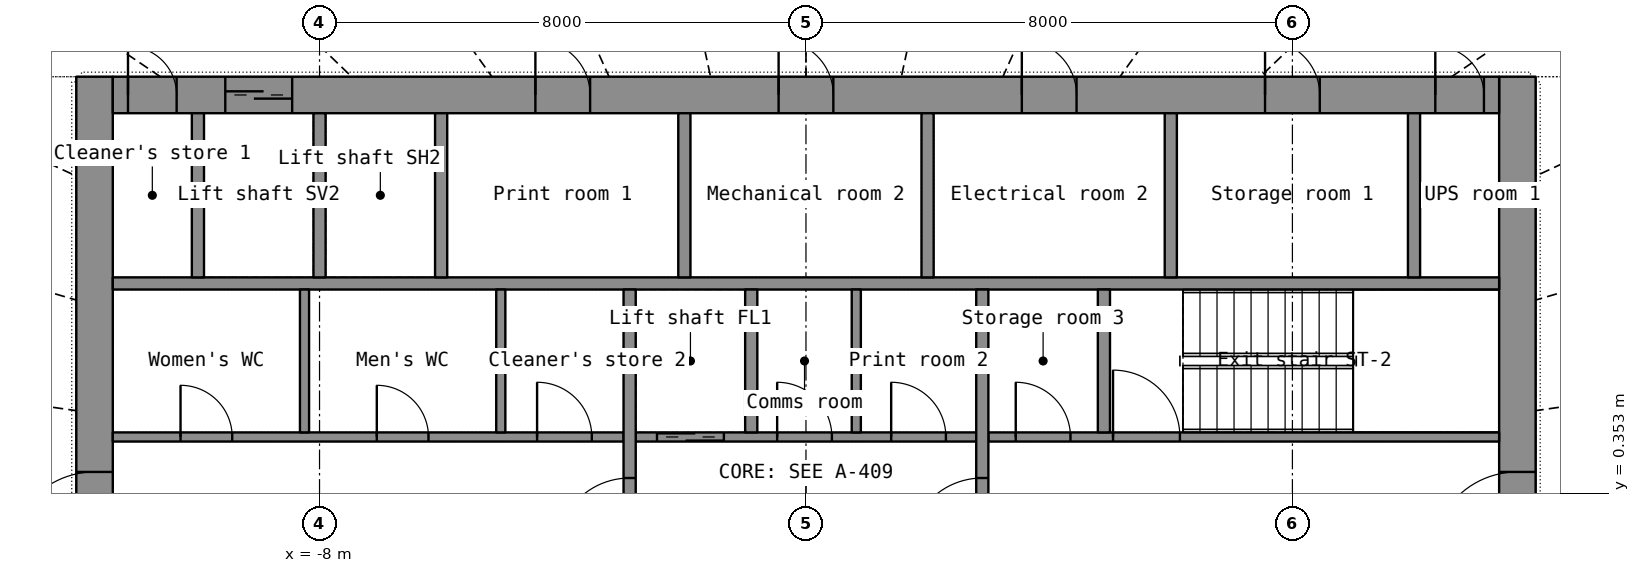
"""IFC4 building model, lengths in metres.
Left out: names, types, materials, properties, quantities, classifications, styles, units other than length and angle.
Written with IfcOpenShell. Run it as: python <this file> out.ifc"""

import sys

from ifc_helpers import new_model, si_unit, direction, frame, frame_2d, origin, place, context, subcontext, project, spatial, rectangle, extrude, element, fill, save


model = new_model("IFC4")
c1 = context("Model", 3, precision=1e-05, world=origin(), true_north=direction((0.0, 1.0)))
c2 = subcontext(c1, "Body", "Model", "MODEL_VIEW")
j1 = project(units=[si_unit("LENGTHUNIT", "METRE"), si_unit("PLANEANGLEUNIT", "RADIAN")], contexts=[c1])
p1 = place(None, origin())
s1 = spatial("IfcSite", under=j1, at=p1, CompositionType="ELEMENT")
p2 = place(p1, origin())
s2 = spatial("IfcBuilding", under=s1, at=p2, CompositionType="ELEMENT")
p3 = place(p2, frame((0.0, 0.0, 55.6)))
s3 = spatial("IfcBuildingStorey", under=s2, at=p3, CompositionType="ELEMENT", Elevation=55.6)
p4 = place(p3, frame((-11.7, -7.2, 0.0), z_axis=(0.0, 0.0, 1.0), x_axis=(0.0, 1.0, 0.0)))
e1 = element("IfcWall", 1, at=p4, inside=s3, PredefinedType="SHEAR", context=c2, shape_type="SweptSolid", body=[
    extrude(rectangle(XDim=14.4, YDim=0.6, at=frame_2d((7.2, 0.0))), origin(), (0.0, 0.0, 1.0), 3.3),
])
p5 = place(p4, frame((6.5, 0.0, 0.0)))
e2 = element("IfcOpeningElement", 2, at=p5, cuts=e1, PredefinedType="OPENING", context=c2, shape_type="SweptSolid", body=[
    extrude(rectangle(XDim=1.4, YDim=2.2, at=frame_2d((0.7, 1.1))), frame((0.0, 0.31, 0.0), z_axis=(0.0, -1.0, 0.0), x_axis=(1.0, 0.0, 0.0)), (0.0, 0.0, 1.0), 0.62),
])
p6 = place(p3, frame((11.7, -7.2, 0.0), z_axis=(0.0, 0.0, 1.0), x_axis=(0.0, 1.0, 0.0)))
e3 = element("IfcWall", 3, at=p6, inside=s3, PredefinedType="SHEAR", context=c2, shape_type="SweptSolid", body=[
    extrude(rectangle(XDim=14.4, YDim=0.6, at=frame_2d((7.2, 0.0))), origin(), (0.0, 0.0, 1.0), 3.3),
])
p7 = place(p6, frame((6.5, 0.0, 0.0)))
e4 = element("IfcOpeningElement", 4, at=p7, cuts=e3, PredefinedType="OPENING", context=c2, shape_type="SweptSolid", body=[
    extrude(rectangle(XDim=1.4, YDim=2.2, at=frame_2d((0.7, 1.1))), frame((0.0, 0.31, 0.0), z_axis=(0.0, -1.0, 0.0), x_axis=(1.0, 0.0, 0.0)), (0.0, 0.0, 1.0), 0.62),
])
p8 = place(p3, frame((-11.4, 6.9, 0.0), z_axis=(0.0, 0.0, 1.0), x_axis=(1.0, 0.0, 0.0)))
e5 = element("IfcWall", 5, at=p8, inside=s3, PredefinedType="SHEAR", context=c2, shape_type="SweptSolid", body=[
    extrude(rectangle(XDim=22.8, YDim=0.6, at=frame_2d((11.4, 0.0))), origin(), (0.0, 0.0, 1.0), 3.3),
])
p9 = place(p8, frame((1.85, 0.0, 0.0)))
e6 = element("IfcOpeningElement", 6, at=p9, cuts=e5, PredefinedType="OPENING", context=c2, shape_type="SweptSolid", body=[
    extrude(rectangle(XDim=1.1, YDim=2.2, at=frame_2d((0.55, 1.1))), frame((0.0, 0.31, 0.0), z_axis=(0.0, -1.0, 0.0), x_axis=(1.0, 0.0, 0.0)), (0.0, 0.0, 1.0), 0.62),
])
p10 = place(p8, frame((6.95, 0.0, 0.0)))
e7 = element("IfcOpeningElement", 7, at=p10, cuts=e5, PredefinedType="OPENING", context=c2, shape_type="SweptSolid", body=[
    extrude(rectangle(XDim=0.9, YDim=2.1, at=frame_2d((0.45, 1.05))), frame((0.0, 0.31, 0.0), z_axis=(0.0, -1.0, 0.0), x_axis=(1.0, 0.0, 0.0)), (0.0, 0.0, 1.0), 0.62),
])
p11 = place(p8, frame((10.95, 0.0, 0.0)))
e8 = element("IfcOpeningElement", 8, at=p11, cuts=e5, PredefinedType="OPENING", context=c2, shape_type="SweptSolid", body=[
    extrude(rectangle(XDim=0.9, YDim=2.1, at=frame_2d((0.45, 1.05))), frame((0.0, 0.31, 0.0), z_axis=(0.0, -1.0, 0.0), x_axis=(1.0, 0.0, 0.0)), (0.0, 0.0, 1.0), 0.62),
])
p12 = place(p8, frame((14.95, 0.0, 0.0)))
e9 = element("IfcOpeningElement", 9, at=p12, cuts=e5, PredefinedType="OPENING", context=c2, shape_type="SweptSolid", body=[
    extrude(rectangle(XDim=0.9, YDim=2.1, at=frame_2d((0.45, 1.05))), frame((0.0, 0.31, 0.0), z_axis=(0.0, -1.0, 0.0), x_axis=(1.0, 0.0, 0.0)), (0.0, 0.0, 1.0), 0.62),
])
p13 = place(p8, frame((18.95, 0.0, 0.0)))
e10 = element("IfcOpeningElement", 10, at=p13, cuts=e5, PredefinedType="OPENING", context=c2, shape_type="SweptSolid", body=[
    extrude(rectangle(XDim=0.9, YDim=2.1, at=frame_2d((0.45, 1.05))), frame((0.0, 0.31, 0.0), z_axis=(0.0, -1.0, 0.0), x_axis=(1.0, 0.0, 0.0)), (0.0, 0.0, 1.0), 0.62),
])
p14 = place(p8, frame((0.25, 0.0, 0.0)))
e11 = element("IfcOpeningElement", 11, at=p14, cuts=e5, PredefinedType="OPENING", context=c2, shape_type="SweptSolid", body=[
    extrude(rectangle(XDim=0.8, YDim=2.05, at=frame_2d((0.4, 1.025))), frame((0.0, 0.31, 0.0), z_axis=(0.0, -1.0, 0.0), x_axis=(1.0, 0.0, 0.0)), (0.0, 0.0, 1.0), 0.62),
])
p15 = place(p8, frame((21.75, 0.0, 0.0)))
e12 = element("IfcOpeningElement", 12, at=p15, cuts=e5, PredefinedType="OPENING", context=c2, shape_type="SweptSolid", body=[
    extrude(rectangle(XDim=0.8, YDim=2.05, at=frame_2d((0.4, 1.025))), frame((0.0, 0.31, 0.0), z_axis=(0.0, -1.0, 0.0), x_axis=(1.0, 0.0, 0.0)), (0.0, 0.0, 1.0), 0.62),
])
p16 = place(p3, frame((-11.4, 3.8, 0.0), z_axis=(0.0, 0.0, 1.0), x_axis=(1.0, 0.0, 0.0)))
e13 = element("IfcWall", 13, at=p16, inside=s3, PredefinedType="SHEAR", context=c2, shape_type="SweptSolid", body=[
    extrude(rectangle(XDim=22.8, YDim=0.2, at=frame_2d((11.4, 0.0))), origin(), (0.0, 0.0, 1.0), 3.3),
])
for number, where, z_axis, x_axis in (
    (14, (-10.0, 3.9, 0.0), (0.0, 0.0, 1.0), (0.0, 1.0, 0.0)),
    (15, (-8.0, 3.9, 0.0), (0.0, 0.0, 1.0), (0.0, 1.0, 0.0)),
    (16, (-6.0, 3.9, 0.0), (0.0, 0.0, 1.0), (0.0, 1.0, 0.0)),
    (17, (10.0, 3.9, 0.0), (0.0, 0.0, 1.0), (0.0, 1.0, 0.0)),
):
    element("IfcWall", number, at=place(p3, frame(where, z_axis=z_axis, x_axis=x_axis)), inside=s3, PredefinedType="SHEAR", context=c2, shape_type="SweptSolid", body=[
        extrude(rectangle(XDim=2.7, YDim=0.2, at=frame_2d((1.35, 0.0))), origin(), (0.0, 0.0, 1.0), 3.3),
    ])
for number, where, z_axis, x_axis in (
    (18, (-2.0, 3.9, 0.0), (0.0, 0.0, 1.0), (0.0, 1.0, 0.0)),
    (19, (2.0, 3.9, 0.0), (0.0, 0.0, 1.0), (0.0, 1.0, 0.0)),
    (20, (6.0, 3.9, 0.0), (0.0, 0.0, 1.0), (0.0, 1.0, 0.0)),
):
    element("IfcWall", number, at=place(p3, frame(where, z_axis=z_axis, x_axis=x_axis)), inside=s3, PredefinedType="PARTITIONING", context=c2, shape_type="SweptSolid", body=[
        extrude(rectangle(XDim=2.7, YDim=0.2, at=frame_2d((1.35, 0.0))), origin(), (0.0, 0.0, 1.0), 3.3),
    ])
p17 = place(p3, frame((-11.4, 1.275, 0.0), z_axis=(0.0, 0.0, 1.0), x_axis=(1.0, 0.0, 0.0)))
e21 = element("IfcWall", 21, at=p17, inside=s3, PredefinedType="PARTITIONING", context=c2, shape_type="SweptSolid", body=[
    extrude(rectangle(XDim=8.4, YDim=0.15, at=frame_2d((4.2, 0.0))), origin(), (0.0, 0.0, 1.0), 3.3),
])
p18 = place(p17, frame((1.114, 0.0, 0.0)))
e22 = element("IfcOpeningElement", 22, at=p18, cuts=e21, PredefinedType="OPENING", context=c2, shape_type="SweptSolid", body=[
    extrude(rectangle(XDim=0.85, YDim=2.1, at=frame_2d((0.425, 1.05))), frame((0.0, 0.085, 0.0), z_axis=(0.0, -1.0, 0.0), x_axis=(1.0, 0.0, 0.0)), (0.0, 0.0, 1.0), 0.17),
])
p19 = place(p17, frame((4.342, 0.0, 0.0)))
e23 = element("IfcOpeningElement", 23, at=p19, cuts=e21, PredefinedType="OPENING", context=c2, shape_type="SweptSolid", body=[
    extrude(rectangle(XDim=0.85, YDim=2.1, at=frame_2d((0.425, 1.05))), frame((0.0, 0.085, 0.0), z_axis=(0.0, -1.0, 0.0), x_axis=(1.0, 0.0, 0.0)), (0.0, 0.0, 1.0), 0.17),
])
p20 = place(p17, frame((6.978, 0.0, 0.0)))
e24 = element("IfcOpeningElement", 24, at=p20, cuts=e21, PredefinedType="OPENING", context=c2, shape_type="SweptSolid", body=[
    extrude(rectangle(XDim=0.9, YDim=2.1, at=frame_2d((0.45, 1.05))), frame((0.0, 0.085, 0.0), z_axis=(0.0, -1.0, 0.0), x_axis=(1.0, 0.0, 0.0)), (0.0, 0.0, 1.0), 0.17),
])
p21 = place(p3, frame((-2.8, 1.275, 0.0), z_axis=(0.0, 0.0, 1.0), x_axis=(1.0, 0.0, 0.0)))
e25 = element("IfcWall", 25, at=p21, inside=s3, PredefinedType="SHEAR", context=c2, shape_type="SweptSolid", body=[
    extrude(rectangle(XDim=5.6, YDim=0.15, at=frame_2d((2.8, 0.0))), origin(), (0.0, 0.0, 1.0), 3.3),
])
p22 = place(p21, frame((0.35, 0.0, 0.0)))
e26 = element("IfcOpeningElement", 26, at=p22, cuts=e25, PredefinedType="OPENING", context=c2, shape_type="SweptSolid", body=[
    extrude(rectangle(XDim=1.1, YDim=2.2, at=frame_2d((0.55, 1.1))), frame((0.0, 0.085, 0.0), z_axis=(0.0, -1.0, 0.0), x_axis=(1.0, 0.0, 0.0)), (0.0, 0.0, 1.0), 0.17),
])
p23 = place(p21, frame((2.326, 0.0, 0.0)))
e27 = element("IfcOpeningElement", 27, at=p23, cuts=e25, PredefinedType="OPENING", context=c2, shape_type="SweptSolid", body=[
    extrude(rectangle(XDim=0.9, YDim=2.1, at=frame_2d((0.45, 1.05))), frame((0.0, 0.085, 0.0), z_axis=(0.0, -1.0, 0.0), x_axis=(1.0, 0.0, 0.0)), (0.0, 0.0, 1.0), 0.17),
])
p24 = place(p21, frame((4.201, 0.0, 0.0)))
e28 = element("IfcOpeningElement", 28, at=p24, cuts=e25, PredefinedType="OPENING", context=c2, shape_type="SweptSolid", body=[
    extrude(rectangle(XDim=0.9, YDim=2.1, at=frame_2d((0.45, 1.05))), frame((0.0, 0.085, 0.0), z_axis=(0.0, -1.0, 0.0), x_axis=(1.0, 0.0, 0.0)), (0.0, 0.0, 1.0), 0.17),
])
p25 = place(p3, frame((3.0, 1.275, 0.0), z_axis=(0.0, 0.0, 1.0), x_axis=(1.0, 0.0, 0.0)))
e29 = element("IfcWall", 29, at=p25, inside=s3, PredefinedType="SHEAR", context=c2, shape_type="SweptSolid", body=[
    extrude(rectangle(XDim=8.4, YDim=0.15, at=frame_2d((4.2, 0.0))), origin(), (0.0, 0.0, 1.0), 3.3),
])
p26 = place(p25, frame((2.05, 0.0, 0.0)))
e30 = element("IfcOpeningElement", 30, at=p26, cuts=e29, PredefinedType="OPENING", context=c2, shape_type="SweptSolid", body=[
    extrude(rectangle(XDim=1.1, YDim=2.15, at=frame_2d((0.55, 1.075))), frame((0.0, 0.085, 0.0), z_axis=(0.0, -1.0, 0.0), x_axis=(1.0, 0.0, 0.0)), (0.0, 0.0, 1.0), 0.17),
])
p27 = place(p25, frame((0.45, 0.0, 0.0)))
e31 = element("IfcOpeningElement", 31, at=p27, cuts=e29, PredefinedType="OPENING", context=c2, shape_type="SweptSolid", body=[
    extrude(rectangle(XDim=0.9, YDim=2.1, at=frame_2d((0.45, 1.05))), frame((0.0, 0.085, 0.0), z_axis=(0.0, -1.0, 0.0), x_axis=(1.0, 0.0, 0.0)), (0.0, 0.0, 1.0), 0.17),
])
p28 = place(p3, frame((-2.9, -3.7, 0.0), z_axis=(0.0, 0.0, 1.0), x_axis=(0.0, 1.0, 0.0)))
e32 = element("IfcWall", 32, at=p28, inside=s3, PredefinedType="SHEAR", context=c2, shape_type="SweptSolid", body=[
    extrude(rectangle(XDim=7.4, YDim=0.2, at=frame_2d((3.7, 0.0))), origin(), (0.0, 0.0, 1.0), 3.3),
])
p29 = place(p28, frame((3.1, 0.0, 0.0)))
e33 = element("IfcOpeningElement", 33, at=p29, cuts=e32, PredefinedType="OPENING", context=c2, shape_type="SweptSolid", body=[
    extrude(rectangle(XDim=1.2, YDim=2.2, at=frame_2d((0.6, 1.1))), frame((0.0, 0.11, 0.0), z_axis=(0.0, -1.0, 0.0), x_axis=(1.0, 0.0, 0.0)), (0.0, 0.0, 1.0), 0.22),
])
p30 = place(p3, frame((2.9, -3.7, 0.0), z_axis=(0.0, 0.0, 1.0), x_axis=(0.0, 1.0, 0.0)))
e34 = element("IfcWall", 34, at=p30, inside=s3, PredefinedType="SHEAR", context=c2, shape_type="SweptSolid", body=[
    extrude(rectangle(XDim=7.4, YDim=0.2, at=frame_2d((3.7, 0.0))), origin(), (0.0, 0.0, 1.0), 3.3),
])
p31 = place(p30, frame((3.1, 0.0, 0.0)))
e35 = element("IfcOpeningElement", 35, at=p31, cuts=e34, PredefinedType="OPENING", context=c2, shape_type="SweptSolid", body=[
    extrude(rectangle(XDim=1.2, YDim=2.2, at=frame_2d((0.6, 1.1))), frame((0.0, 0.11, 0.0), z_axis=(0.0, -1.0, 0.0), x_axis=(1.0, 0.0, 0.0)), (0.0, 0.0, 1.0), 0.22),
])
for number, where, z_axis, x_axis in (
    (36, (-0.9, 1.35, 0.0), (0.0, 0.0, 1.0), (0.0, 1.0, 0.0)),
    (37, (4.9, 1.35, 0.0), (0.0, 0.0, 1.0), (0.0, 1.0, 0.0)),
):
    element("IfcWall", number, at=place(p3, frame(where, z_axis=z_axis, x_axis=x_axis)), inside=s3, PredefinedType="SHEAR", context=c2, shape_type="SweptSolid", body=[
        extrude(rectangle(XDim=2.35, YDim=0.2, at=frame_2d((1.175, 0.0))), origin(), (0.0, 0.0, 1.0), 3.3),
    ])
for number, where, z_axis, x_axis in (
    (38, (-8.247, 1.35, 0.0), (0.0, 0.0, 1.0), (0.0, 1.0, 0.0)),
    (39, (-5.019, 1.35, 0.0), (0.0, 0.0, 1.0), (0.0, 1.0, 0.0)),
    (40, (0.827, 1.35, 0.0), (0.0, 0.0, 1.0), (0.0, 1.0, 0.0)),
):
    element("IfcWall", number, at=place(p3, frame(where, z_axis=z_axis, x_axis=x_axis)), inside=s3, PredefinedType="PARTITIONING", context=c2, shape_type="SweptSolid", body=[
        extrude(rectangle(XDim=2.35, YDim=0.15, at=frame_2d((1.175, 0.0))), origin(), (0.0, 0.0, 1.0), 3.3),
    ])
p32 = place(p9, origin())
e41 = element("IfcDoor", 41, at=p32, inside=s3, OperationType="DOUBLE_DOOR_SLIDING", PredefinedType="DOOR", context=c2, shape_type="SweptSolid", body=[
    extrude(rectangle(XDim=1.1, YDim=2.2, at=frame_2d((0.55, 1.1))), frame((0.0, 0.025, 0.0), z_axis=(0.0, -1.0, 0.0), x_axis=(1.0, 0.0, 0.0)), (0.0, 0.0, 1.0), 0.05),
])
fill(e6, e41)
p33 = place(p10, origin())
e42 = element("IfcDoor", 42, at=p33, inside=s3, OperationType="SINGLE_SWING_LEFT", PredefinedType="DOOR", context=c2, shape_type="SweptSolid", body=[
    extrude(rectangle(XDim=0.9, YDim=2.1, at=frame_2d((0.45, 1.05))), frame((0.0, 0.025, 0.0), z_axis=(0.0, -1.0, 0.0), x_axis=(1.0, 0.0, 0.0)), (0.0, 0.0, 1.0), 0.05),
])
fill(e7, e42)
p34 = place(p11, origin())
e43 = element("IfcDoor", 43, at=p34, inside=s3, OperationType="SINGLE_SWING_LEFT", PredefinedType="DOOR", context=c2, shape_type="SweptSolid", body=[
    extrude(rectangle(XDim=0.9, YDim=2.1, at=frame_2d((0.45, 1.05))), frame((0.0, 0.025, 0.0), z_axis=(0.0, -1.0, 0.0), x_axis=(1.0, 0.0, 0.0)), (0.0, 0.0, 1.0), 0.05),
])
fill(e8, e43)
p35 = place(p12, origin())
e44 = element("IfcDoor", 44, at=p35, inside=s3, OperationType="SINGLE_SWING_LEFT", PredefinedType="DOOR", context=c2, shape_type="SweptSolid", body=[
    extrude(rectangle(XDim=0.9, YDim=2.1, at=frame_2d((0.45, 1.05))), frame((0.0, 0.025, 0.0), z_axis=(0.0, -1.0, 0.0), x_axis=(1.0, 0.0, 0.0)), (0.0, 0.0, 1.0), 0.05),
])
fill(e9, e44)
p36 = place(p13, origin())
e45 = element("IfcDoor", 45, at=p36, inside=s3, OperationType="SINGLE_SWING_LEFT", PredefinedType="DOOR", context=c2, shape_type="SweptSolid", body=[
    extrude(rectangle(XDim=0.9, YDim=2.1, at=frame_2d((0.45, 1.05))), frame((0.0, 0.025, 0.0), z_axis=(0.0, -1.0, 0.0), x_axis=(1.0, 0.0, 0.0)), (0.0, 0.0, 1.0), 0.05),
])
fill(e10, e45)
p37 = place(p14, origin())
e46 = element("IfcDoor", 46, at=p37, inside=s3, OperationType="SINGLE_SWING_LEFT", PredefinedType="DOOR", context=c2, shape_type="SweptSolid", body=[
    extrude(rectangle(XDim=0.8, YDim=2.05, at=frame_2d((0.4, 1.025))), frame((0.0, 0.025, 0.0), z_axis=(0.0, -1.0, 0.0), x_axis=(1.0, 0.0, 0.0)), (0.0, 0.0, 1.0), 0.05),
])
fill(e11, e46)
p38 = place(p15, origin())
e47 = element("IfcDoor", 47, at=p38, inside=s3, OperationType="SINGLE_SWING_LEFT", PredefinedType="DOOR", context=c2, shape_type="SweptSolid", body=[
    extrude(rectangle(XDim=0.8, YDim=2.05, at=frame_2d((0.4, 1.025))), frame((0.0, 0.025, 0.0), z_axis=(0.0, -1.0, 0.0), x_axis=(1.0, 0.0, 0.0)), (0.0, 0.0, 1.0), 0.05),
])
fill(e12, e47)
p39 = place(p5, origin())
e48 = element("IfcDoor", 48, at=p39, inside=s3, OperationType="DOUBLE_DOOR_SINGLE_SWING", PredefinedType="DOOR", context=c2, shape_type="SweptSolid", body=[
    extrude(rectangle(XDim=1.4, YDim=2.2, at=frame_2d((0.7, 1.1))), frame((0.0, 0.025, 0.0), z_axis=(0.0, -1.0, 0.0), x_axis=(1.0, 0.0, 0.0)), (0.0, 0.0, 1.0), 0.05),
])
fill(e2, e48)
p40 = place(p7, origin())
e49 = element("IfcDoor", 49, at=p40, inside=s3, OperationType="DOUBLE_DOOR_SINGLE_SWING", PredefinedType="DOOR", context=c2, shape_type="SweptSolid", body=[
    extrude(rectangle(XDim=1.4, YDim=2.2, at=frame_2d((0.7, 1.1))), frame((0.0, 0.025, 0.0), z_axis=(0.0, -1.0, 0.0), x_axis=(1.0, 0.0, 0.0)), (0.0, 0.0, 1.0), 0.05),
])
fill(e4, e49)
p41 = place(p29, origin())
e50 = element("IfcDoor", 50, at=p41, inside=s3, OperationType="SINGLE_SWING_LEFT", PredefinedType="DOOR", context=c2, shape_type="SweptSolid", body=[
    extrude(rectangle(XDim=1.2, YDim=2.2, at=frame_2d((0.6, 1.1))), frame((0.0, 0.025, 0.0), z_axis=(0.0, -1.0, 0.0), x_axis=(1.0, 0.0, 0.0)), (0.0, 0.0, 1.0), 0.05),
])
fill(e33, e50)
p42 = place(p31, origin())
e51 = element("IfcDoor", 51, at=p42, inside=s3, OperationType="SINGLE_SWING_LEFT", PredefinedType="DOOR", context=c2, shape_type="SweptSolid", body=[
    extrude(rectangle(XDim=1.2, YDim=2.2, at=frame_2d((0.6, 1.1))), frame((0.0, 0.025, 0.0), z_axis=(0.0, -1.0, 0.0), x_axis=(1.0, 0.0, 0.0)), (0.0, 0.0, 1.0), 0.05),
])
fill(e35, e51)
p43 = place(p22, origin())
e52 = element("IfcDoor", 52, at=p43, inside=s3, OperationType="DOUBLE_DOOR_SLIDING", PredefinedType="DOOR", context=c2, shape_type="SweptSolid", body=[
    extrude(rectangle(XDim=1.1, YDim=2.2, at=frame_2d((0.55, 1.1))), frame((0.0, 0.025, 0.0), z_axis=(0.0, -1.0, 0.0), x_axis=(1.0, 0.0, 0.0)), (0.0, 0.0, 1.0), 0.05),
])
fill(e26, e52)
p44 = place(p26, origin())
e53 = element("IfcDoor", 53, at=p44, inside=s3, OperationType="SINGLE_SWING_LEFT", PredefinedType="DOOR", context=c2, shape_type="SweptSolid", body=[
    extrude(rectangle(XDim=1.1, YDim=2.15, at=frame_2d((0.55, 1.075))), frame((0.0, 0.025, 0.0), z_axis=(0.0, -1.0, 0.0), x_axis=(1.0, 0.0, 0.0)), (0.0, 0.0, 1.0), 0.05),
])
fill(e30, e53)
p45 = place(p18, origin())
e54 = element("IfcDoor", 54, at=p45, inside=s3, OperationType="SINGLE_SWING_LEFT", PredefinedType="DOOR", context=c2, shape_type="SweptSolid", body=[
    extrude(rectangle(XDim=0.85, YDim=2.1, at=frame_2d((0.425, 1.05))), frame((0.0, 0.025, 0.0), z_axis=(0.0, -1.0, 0.0), x_axis=(1.0, 0.0, 0.0)), (0.0, 0.0, 1.0), 0.05),
])
fill(e22, e54)
p46 = place(p19, origin())
e55 = element("IfcDoor", 55, at=p46, inside=s3, OperationType="SINGLE_SWING_LEFT", PredefinedType="DOOR", context=c2, shape_type="SweptSolid", body=[
    extrude(rectangle(XDim=0.85, YDim=2.1, at=frame_2d((0.425, 1.05))), frame((0.0, 0.025, 0.0), z_axis=(0.0, -1.0, 0.0), x_axis=(1.0, 0.0, 0.0)), (0.0, 0.0, 1.0), 0.05),
])
fill(e23, e55)
p47 = place(p20, origin())
e56 = element("IfcDoor", 56, at=p47, inside=s3, OperationType="SINGLE_SWING_LEFT", PredefinedType="DOOR", context=c2, shape_type="SweptSolid", body=[
    extrude(rectangle(XDim=0.9, YDim=2.1, at=frame_2d((0.45, 1.05))), frame((0.0, 0.025, 0.0), z_axis=(0.0, -1.0, 0.0), x_axis=(1.0, 0.0, 0.0)), (0.0, 0.0, 1.0), 0.05),
])
fill(e24, e56)
p48 = place(p23, origin())
e57 = element("IfcDoor", 57, at=p48, inside=s3, OperationType="SINGLE_SWING_LEFT", PredefinedType="DOOR", context=c2, shape_type="SweptSolid", body=[
    extrude(rectangle(XDim=0.9, YDim=2.1, at=frame_2d((0.45, 1.05))), frame((0.0, 0.025, 0.0), z_axis=(0.0, -1.0, 0.0), x_axis=(1.0, 0.0, 0.0)), (0.0, 0.0, 1.0), 0.05),
])
fill(e27, e57)
p49 = place(p24, origin())
e58 = element("IfcDoor", 58, at=p49, inside=s3, OperationType="SINGLE_SWING_LEFT", PredefinedType="DOOR", context=c2, shape_type="SweptSolid", body=[
    extrude(rectangle(XDim=0.9, YDim=2.1, at=frame_2d((0.45, 1.05))), frame((0.0, 0.025, 0.0), z_axis=(0.0, -1.0, 0.0), x_axis=(1.0, 0.0, 0.0)), (0.0, 0.0, 1.0), 0.05),
])
fill(e28, e58)
p50 = place(p27, origin())
e59 = element("IfcDoor", 59, at=p50, inside=s3, OperationType="SINGLE_SWING_LEFT", PredefinedType="DOOR", context=c2, shape_type="SweptSolid", body=[
    extrude(rectangle(XDim=0.9, YDim=2.1, at=frame_2d((0.45, 1.05))), frame((0.0, 0.025, 0.0), z_axis=(0.0, -1.0, 0.0), x_axis=(1.0, 0.0, 0.0)), (0.0, 0.0, 1.0), 0.05),
])
fill(e31, e59)
save(model, sys.argv[1])
